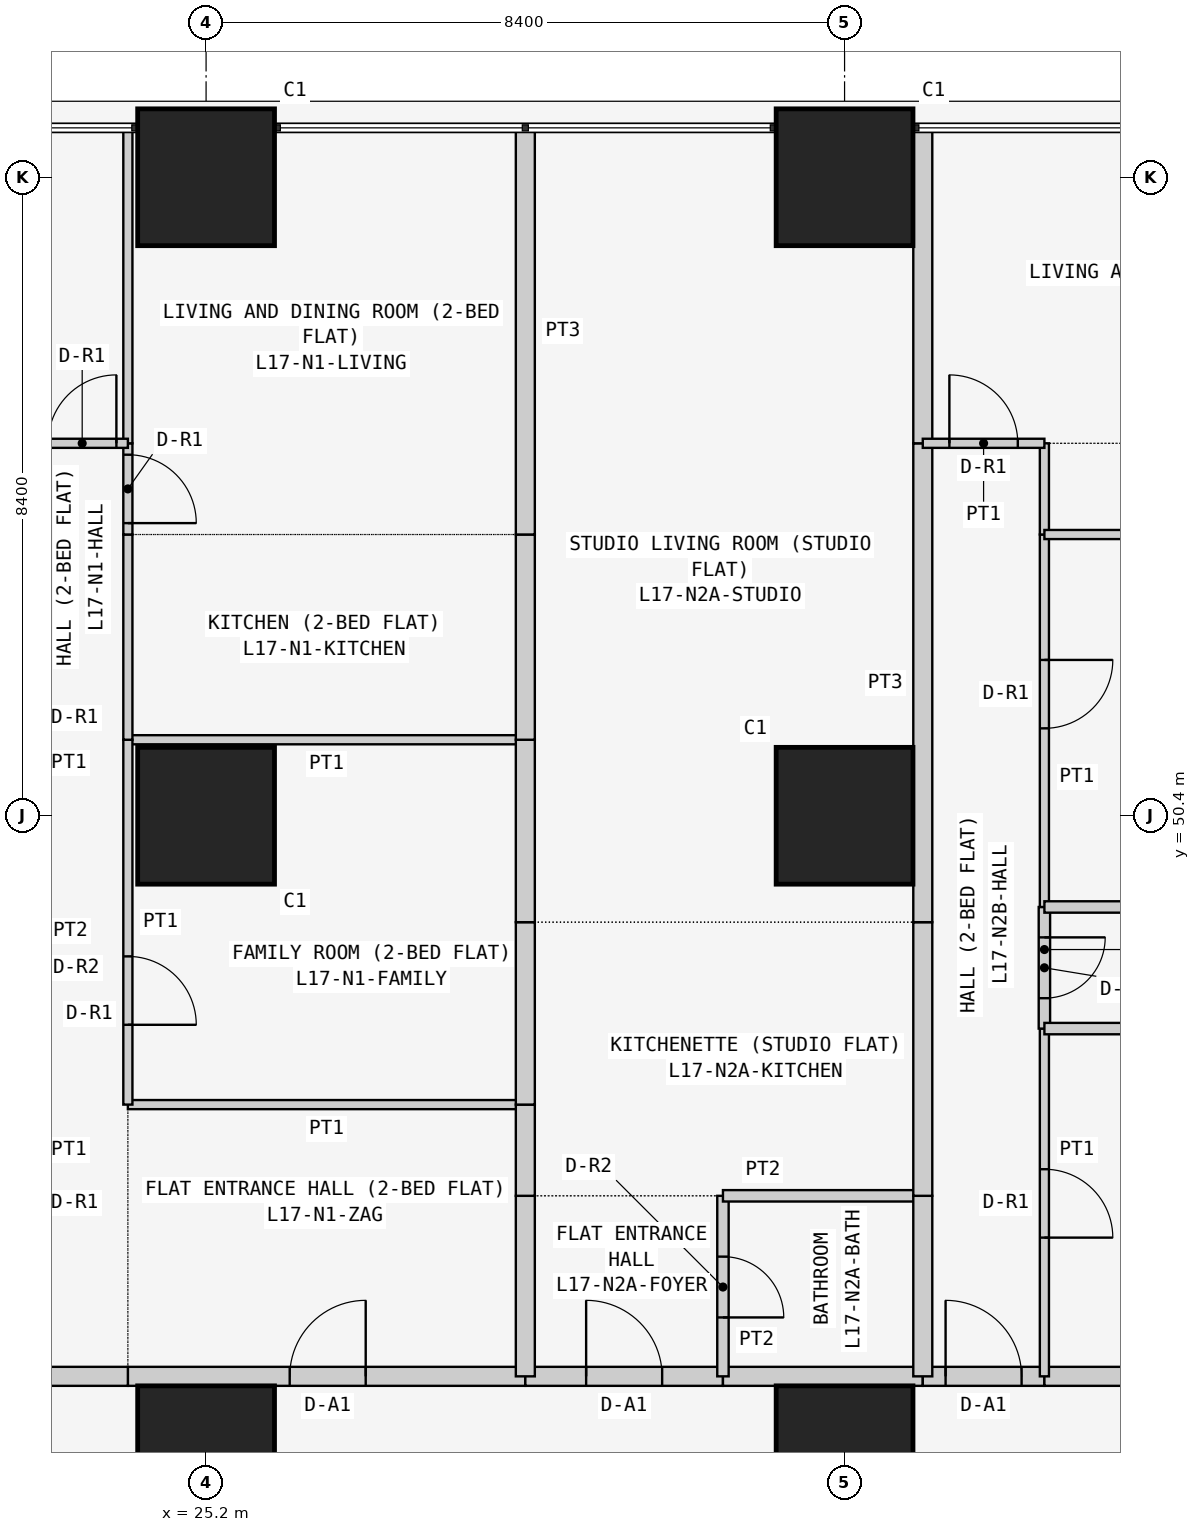
"""IFC4 building model, lengths in metres.
Left out: names, types, materials, properties, quantities, classifications, styles, units other than length and angle.
Written with IfcOpenShell. Run it as: python <this file> out.ifc"""

import sys

from ifc_helpers import new_model, si_unit, direction, frame, frame_2d, origin, origin_2d, place, context, subcontext, project, spatial, rectangle, extrude, element, fill, save


model = new_model("IFC4")
c1 = context("Model", 3, precision=1e-05, world=origin(), true_north=direction((0.0, 1.0)))
c2 = subcontext(c1, "Body", "Model", "MODEL_VIEW")
j1 = project(units=[si_unit("LENGTHUNIT", "METRE"), si_unit("PLANEANGLEUNIT", "RADIAN")], contexts=[c1])
p1 = place(None, origin())
s1 = spatial("IfcSite", under=j1, at=p1, CompositionType="ELEMENT")
p2 = place(p1, origin())
s2 = spatial("IfcBuilding", under=s1, at=p2, CompositionType="ELEMENT")
p3 = place(p2, frame((0.0, 0.0, 70.5)))
s3 = spatial("IfcBuildingStorey", under=s2, at=p3, CompositionType="ELEMENT", Elevation=70.5)
for number, where, z_axis, x_axis in (
    (1, (25.2, 42.0, 0.0), (0.0, 0.0, 1.0), (1.0, 0.0, 0.0)),
    (2, (25.2, 50.4, 0.0), (0.0, 0.0, 1.0), (1.0, 0.0, 0.0)),
    (3, (25.2, 58.8, 0.0), (0.0, 0.0, 1.0), (1.0, 0.0, 0.0)),
    (4, (33.6, 42.0, 0.0), (0.0, 0.0, 1.0), (1.0, 0.0, 0.0)),
    (5, (33.6, 50.4, 0.0), (0.0, 0.0, 1.0), (1.0, 0.0, 0.0)),
    (6, (33.6, 58.8, 0.0), (0.0, 0.0, 1.0), (1.0, 0.0, 0.0)),
):
    element("IfcColumn", number, at=place(p3, frame(where, z_axis=z_axis, x_axis=x_axis)), inside=s3, PredefinedType="COLUMN", context=c2, shape_type="SweptSolid", body=[
        extrude(rectangle(XDim=1.8, YDim=1.8, at=origin_2d()), origin(), (0.0, 0.0, 1.0), 3.6),
    ])
p4 = place(p3, frame((24.171, 43.025, 0.0), z_axis=(0.0, 0.0, 1.0), x_axis=(1.0, 0.0, 0.0)))
e7 = element("IfcWall", 7, at=p4, inside=s3, PredefinedType="PARTITIONING", context=c2, shape_type="SweptSolid", body=[
    extrude(rectangle(XDim=5.229, YDim=0.25, at=frame_2d((2.615, 0.0))), origin(), (0.0, 0.0, 1.0), 3.45),
])
p5 = place(p4, frame((2.129, 0.0, 0.0)))
e8 = element("IfcOpeningElement", 8, at=p5, cuts=e7, PredefinedType="OPENING", context=c2, shape_type="SweptSolid", body=[
    extrude(rectangle(XDim=1.0, YDim=2.1, at=frame_2d((0.5, 1.05))), frame((0.0, 0.135, 0.0), z_axis=(0.0, -1.0, 0.0), x_axis=(1.0, 0.0, 0.0)), (0.0, 0.0, 1.0), 0.27),
])
p6 = place(p3, frame((22.971, 43.025, 0.0), z_axis=(0.0, 0.0, 1.0), x_axis=(1.0, 0.0, 0.0)))
e9 = element("IfcWall", 9, at=p6, inside=s3, PredefinedType="PARTITIONING", context=c2, shape_type="SweptSolid", body=[
    extrude(rectangle(XDim=1.2, YDim=0.25, at=frame_2d((0.6, 0.0))), origin(), (0.0, 0.0, 1.0), 3.45),
])
p7 = place(p3, frame((29.4, 43.025, 0.0), z_axis=(0.0, 0.0, 1.0), x_axis=(1.0, 0.0, 0.0)))
e10 = element("IfcWall", 10, at=p7, inside=s3, PredefinedType="PARTITIONING", context=c2, shape_type="SweptSolid", body=[
    extrude(rectangle(XDim=2.6, YDim=0.25, at=frame_2d((1.3, 0.0))), origin(), (0.0, 0.0, 1.0), 3.45),
])
p8 = place(p7, frame((0.8, 0.0, 0.0)))
e11 = element("IfcOpeningElement", 11, at=p8, cuts=e10, PredefinedType="OPENING", context=c2, shape_type="SweptSolid", body=[
    extrude(rectangle(XDim=1.0, YDim=2.1, at=frame_2d((0.5, 1.05))), frame((0.0, 0.135, 0.0), z_axis=(0.0, -1.0, 0.0), x_axis=(1.0, 0.0, 0.0)), (0.0, 0.0, 1.0), 0.27),
])
p9 = place(p3, frame((32.0, 43.025, 0.0), z_axis=(0.0, 0.0, 1.0), x_axis=(1.0, 0.0, 0.0)))
e12 = element("IfcWall", 12, at=p9, inside=s3, PredefinedType="PARTITIONING", context=c2, shape_type="SweptSolid", body=[
    extrude(rectangle(XDim=2.629, YDim=0.25, at=frame_2d((1.314, 0.0))), origin(), (0.0, 0.0, 1.0), 3.45),
])
p10 = place(p3, frame((34.629, 43.025, 0.0), z_axis=(0.0, 0.0, 1.0), x_axis=(1.0, 0.0, 0.0)))
e13 = element("IfcWall", 13, at=p10, inside=s3, PredefinedType="PARTITIONING", context=c2, shape_type="SweptSolid", body=[
    extrude(rectangle(XDim=1.6, YDim=0.25, at=frame_2d((0.8, 0.0))), origin(), (0.0, 0.0, 1.0), 3.45),
])
p11 = place(p10, frame((0.3, 0.0, 0.0)))
e14 = element("IfcOpeningElement", 14, at=p11, cuts=e13, PredefinedType="OPENING", context=c2, shape_type="SweptSolid", body=[
    extrude(rectangle(XDim=1.0, YDim=2.1, at=frame_2d((0.5, 1.05))), frame((0.0, 0.135, 0.0), z_axis=(0.0, -1.0, 0.0), x_axis=(1.0, 0.0, 0.0)), (0.0, 0.0, 1.0), 0.27),
])
p12 = place(p3, frame((36.229, 43.025, 0.0), z_axis=(0.0, 0.0, 1.0), x_axis=(1.0, 0.0, 0.0)))
e15 = element("IfcWall", 15, at=p12, inside=s3, PredefinedType="PARTITIONING", context=c2, shape_type="SweptSolid", body=[
    extrude(rectangle(XDim=6.471, YDim=0.25, at=frame_2d((3.235, 0.0))), origin(), (0.0, 0.0, 1.0), 3.45),
])
p13 = place(p3, frame((29.4, 46.6, 0.0), z_axis=(0.0, 0.0, 1.0), x_axis=(-1.0, 0.0, 0.0)))
e16 = element("IfcWall", 16, at=p13, inside=s3, PredefinedType="PARTITIONING", context=c2, shape_type="SweptSolid", body=[
    extrude(rectangle(XDim=5.229, YDim=0.12, at=frame_2d((2.615, 0.0))), origin(), (0.0, 0.0, 1.0), 3.45),
])
p14 = place(p3, frame((29.4, 43.025, 0.0), z_axis=(0.0, 0.0, 1.0), x_axis=(0.0, 1.0, 0.0)))
e17 = element("IfcWall", 17, at=p14, inside=s3, PredefinedType="PARTITIONING", context=c2, shape_type="SweptSolid", body=[
    extrude(rectangle(XDim=2.375, YDim=0.25, at=frame_2d((1.188, 0.0))), origin(), (0.0, 0.0, 1.0), 2.848),
])
p15 = place(p3, frame((29.4, 45.4, 0.0), z_axis=(0.0, 0.0, 1.0), x_axis=(0.0, 1.0, 0.0)))
e18 = element("IfcWall", 18, at=p15, inside=s3, PredefinedType="PARTITIONING", context=c2, shape_type="SweptSolid", body=[
    extrude(rectangle(XDim=1.2, YDim=0.25, at=frame_2d((0.6, 0.0))), origin(), (0.0, 0.0, 1.0), 2.848),
])
p16 = place(p3, frame((29.4, 51.4, 0.0), z_axis=(0.0, 0.0, 1.0), x_axis=(-1.0, 0.0, 0.0)))
e19 = element("IfcWall", 19, at=p16, inside=s3, PredefinedType="PARTITIONING", context=c2, shape_type="SweptSolid", body=[
    extrude(rectangle(XDim=5.229, YDim=0.12, at=frame_2d((2.615, 0.0))), origin(), (0.0, 0.0, 1.0), 3.45),
])
p17 = place(p3, frame((24.171, 51.4, 0.0), z_axis=(0.0, 0.0, 1.0), x_axis=(0.0, -1.0, 0.0)))
e20 = element("IfcWall", 20, at=p17, inside=s3, PredefinedType="PARTITIONING", context=c2, shape_type="SweptSolid", body=[
    extrude(rectangle(XDim=4.8, YDim=0.12, at=frame_2d((2.4, 0.0))), origin(), (0.0, 0.0, 1.0), 3.45),
])
p18 = place(p17, frame((2.85, 0.0, 0.0)))
e21 = element("IfcOpeningElement", 21, at=p18, cuts=e20, PredefinedType="OPENING", context=c2, shape_type="SweptSolid", body=[
    extrude(rectangle(XDim=0.9, YDim=2.1, at=frame_2d((0.45, 1.05))), frame((0.0, 0.07, 0.0), z_axis=(0.0, -1.0, 0.0), x_axis=(1.0, 0.0, 0.0)), (0.0, 0.0, 1.0), 0.14),
])
for number, where, z_axis, x_axis in (
    (22, (29.4, 46.6, 0.0), (0.0, 0.0, 1.0), (0.0, 1.0, 0.0)),
    (23, (29.4, 49.0, 0.0), (0.0, 0.0, 1.0), (0.0, 1.0, 0.0)),
):
    element("IfcWall", number, at=place(p3, frame(where, z_axis=z_axis, x_axis=x_axis)), inside=s3, PredefinedType="PARTITIONING", context=c2, shape_type="SweptSolid", body=[
        extrude(rectangle(XDim=2.4, YDim=0.25, at=frame_2d((1.2, 0.0))), origin(), (0.0, 0.0, 1.0), 2.848),
    ])
p19 = place(p3, frame((24.171, 54.1, 0.0), z_axis=(0.0, 0.0, 1.0), x_axis=(0.0, -1.0, 0.0)))
e24 = element("IfcWall", 24, at=p19, inside=s3, PredefinedType="PARTITIONING", context=c2, shape_type="SweptSolid", body=[
    extrude(rectangle(XDim=2.7, YDim=0.12, at=frame_2d((1.35, 0.0))), origin(), (0.0, 0.0, 1.0), 3.45),
])
p20 = place(p3, frame((29.4, 51.4, 0.0), z_axis=(0.0, 0.0, 1.0), x_axis=(0.0, 1.0, 0.0)))
e25 = element("IfcWall", 25, at=p20, inside=s3, PredefinedType="PARTITIONING", context=c2, shape_type="SweptSolid", body=[
    extrude(rectangle(XDim=2.7, YDim=0.25, at=frame_2d((1.35, 0.0))), origin(), (0.0, 0.0, 1.0), 2.848),
])
p21 = place(p3, frame((24.171, 55.3, 0.0), z_axis=(0.0, 0.0, 1.0), x_axis=(0.0, -1.0, 0.0)))
e26 = element("IfcWall", 26, at=p21, inside=s3, PredefinedType="PARTITIONING", context=c2, shape_type="SweptSolid", body=[
    extrude(rectangle(XDim=1.2, YDim=0.12, at=frame_2d((0.6, 0.0))), origin(), (0.0, 0.0, 1.0), 3.45),
])
p22 = place(p21, frame((0.15, 0.0, 0.0)))
e27 = element("IfcOpeningElement", 27, at=p22, cuts=e26, PredefinedType="OPENING", context=c2, shape_type="SweptSolid", body=[
    extrude(rectangle(XDim=0.9, YDim=2.1, at=frame_2d((0.45, 1.05))), frame((0.0, 0.07, 0.0), z_axis=(0.0, -1.0, 0.0), x_axis=(1.0, 0.0, 0.0)), (0.0, 0.0, 1.0), 0.14),
])
p23 = place(p3, frame((24.171, 59.45, 0.0), z_axis=(0.0, 0.0, 1.0), x_axis=(0.0, -1.0, 0.0)))
e28 = element("IfcWall", 28, at=p23, inside=s3, PredefinedType="PARTITIONING", context=c2, shape_type="SweptSolid", body=[
    extrude(rectangle(XDim=4.15, YDim=0.12, at=frame_2d((2.075, 0.0))), origin(), (0.0, 0.0, 1.0), 3.45),
])
p24 = place(p3, frame((29.4, 54.1, 0.0), z_axis=(0.0, 0.0, 1.0), x_axis=(0.0, 1.0, 0.0)))
e29 = element("IfcWall", 29, at=p24, inside=s3, PredefinedType="PARTITIONING", context=c2, shape_type="SweptSolid", body=[
    extrude(rectangle(XDim=5.35, YDim=0.25, at=frame_2d((2.675, 0.0))), origin(), (0.0, 0.0, 1.0), 2.848),
])
p25 = place(p3, frame((24.171, 55.3, 0.0), z_axis=(0.0, 0.0, 1.0), x_axis=(-1.0, 0.0, 0.0)))
e30 = element("IfcWall", 30, at=p25, inside=s3, PredefinedType="PARTITIONING", context=c2, shape_type="SweptSolid", body=[
    extrude(rectangle(XDim=1.2, YDim=0.12, at=frame_2d((0.6, 0.0))), origin(), (0.0, 0.0, 1.0), 3.45),
])
p26 = place(p25, frame((0.151, 0.0, 0.0)))
e31 = element("IfcOpeningElement", 31, at=p26, cuts=e30, PredefinedType="OPENING", context=c2, shape_type="SweptSolid", body=[
    extrude(rectangle(XDim=0.9, YDim=2.1, at=frame_2d((0.45, 1.05))), frame((0.0, 0.07, 0.0), z_axis=(0.0, -1.0, 0.0), x_axis=(1.0, 0.0, 0.0)), (0.0, 0.0, 1.0), 0.14),
])
p27 = place(p3, frame((32.0, 45.4, 0.0), z_axis=(0.0, 0.0, 1.0), x_axis=(0.0, -1.0, 0.0)))
e32 = element("IfcWall", 32, at=p27, inside=s3, PredefinedType="PARTITIONING", context=c2, shape_type="SweptSolid", body=[
    extrude(rectangle(XDim=2.375, YDim=0.15, at=frame_2d((1.188, 0.0))), origin(), (0.0, 0.0, 1.0), 3.45),
])
p28 = place(p27, frame((0.8, 0.0, 0.0)))
e33 = element("IfcOpeningElement", 33, at=p28, cuts=e32, PredefinedType="OPENING", context=c2, shape_type="SweptSolid", body=[
    extrude(rectangle(XDim=0.8, YDim=2.1, at=frame_2d((0.4, 1.05))), frame((0.0, 0.085, 0.0), z_axis=(0.0, -1.0, 0.0), x_axis=(1.0, 0.0, 0.0)), (0.0, 0.0, 1.0), 0.17),
])
p29 = place(p3, frame((32.0, 45.4, 0.0), z_axis=(0.0, 0.0, 1.0), x_axis=(1.0, 0.0, 0.0)))
e34 = element("IfcWall", 34, at=p29, inside=s3, PredefinedType="PARTITIONING", context=c2, shape_type="SweptSolid", body=[
    extrude(rectangle(XDim=2.629, YDim=0.15, at=frame_2d((1.314, 0.0))), origin(), (0.0, 0.0, 1.0), 3.45),
])
p30 = place(p3, frame((34.629, 45.4, 0.0), z_axis=(0.0, 0.0, 1.0), x_axis=(0.0, -1.0, 0.0)))
e35 = element("IfcWall", 35, at=p30, inside=s3, PredefinedType="PARTITIONING", context=c2, shape_type="SweptSolid", body=[
    extrude(rectangle(XDim=2.375, YDim=0.25, at=frame_2d((1.188, 0.0))), origin(), (0.0, 0.0, 1.0), 3.45),
])
p31 = place(p3, frame((34.629, 49.0, 0.0), z_axis=(0.0, 0.0, 1.0), x_axis=(0.0, -1.0, 0.0)))
e36 = element("IfcWall", 36, at=p31, inside=s3, PredefinedType="PARTITIONING", context=c2, shape_type="SweptSolid", body=[
    extrude(rectangle(XDim=3.6, YDim=0.25, at=frame_2d((1.8, 0.0))), origin(), (0.0, 0.0, 1.0), 3.45),
])
p32 = place(p3, frame((34.629, 55.3, 0.0), z_axis=(0.0, 0.0, 1.0), x_axis=(0.0, -1.0, 0.0)))
e37 = element("IfcWall", 37, at=p32, inside=s3, PredefinedType="PARTITIONING", context=c2, shape_type="SweptSolid", body=[
    extrude(rectangle(XDim=6.3, YDim=0.25, at=frame_2d((3.15, 0.0))), origin(), (0.0, 0.0, 1.0), 3.45),
])
p33 = place(p3, frame((34.629, 59.45, 0.0), z_axis=(0.0, 0.0, 1.0), x_axis=(0.0, -1.0, 0.0)))
e38 = element("IfcWall", 38, at=p33, inside=s3, PredefinedType="PARTITIONING", context=c2, shape_type="SweptSolid", body=[
    extrude(rectangle(XDim=4.15, YDim=0.25, at=frame_2d((2.075, 0.0))), origin(), (0.0, 0.0, 1.0), 3.45),
])
p34 = place(p3, frame((36.229, 47.6, 0.0), z_axis=(0.0, 0.0, 1.0), x_axis=(0.0, -1.0, 0.0)))
e39 = element("IfcWall", 39, at=p34, inside=s3, PredefinedType="PARTITIONING", context=c2, shape_type="SweptSolid", body=[
    extrude(rectangle(XDim=4.575, YDim=0.12, at=frame_2d((2.288, 0.0))), origin(), (0.0, 0.0, 1.0), 3.45),
])
p35 = place(p34, frame((1.85, 0.0, 0.0)))
e40 = element("IfcOpeningElement", 40, at=p35, cuts=e39, PredefinedType="OPENING", context=c2, shape_type="SweptSolid", body=[
    extrude(rectangle(XDim=0.9, YDim=2.1, at=frame_2d((0.45, 1.05))), frame((0.0, 0.07, 0.0), z_axis=(0.0, -1.0, 0.0), x_axis=(1.0, 0.0, 0.0)), (0.0, 0.0, 1.0), 0.14),
])
p36 = place(p3, frame((36.229, 49.2, 0.0), z_axis=(0.0, 0.0, 1.0), x_axis=(0.0, -1.0, 0.0)))
e41 = element("IfcWall", 41, at=p36, inside=s3, PredefinedType="PARTITIONING", context=c2, shape_type="SweptSolid", body=[
    extrude(rectangle(XDim=1.6, YDim=0.15, at=frame_2d((0.8, 0.0))), origin(), (0.0, 0.0, 1.0), 3.45),
])
p37 = place(p36, frame((0.4, 0.0, 0.0)))
e42 = element("IfcOpeningElement", 42, at=p37, cuts=e41, PredefinedType="OPENING", context=c2, shape_type="SweptSolid", body=[
    extrude(rectangle(XDim=0.8, YDim=2.1, at=frame_2d((0.4, 1.05))), frame((0.0, 0.085, 0.0), z_axis=(0.0, -1.0, 0.0), x_axis=(1.0, 0.0, 0.0)), (0.0, 0.0, 1.0), 0.17),
])
p38 = place(p3, frame((36.229, 54.1, 0.0), z_axis=(0.0, 0.0, 1.0), x_axis=(0.0, -1.0, 0.0)))
e43 = element("IfcWall", 43, at=p38, inside=s3, PredefinedType="PARTITIONING", context=c2, shape_type="SweptSolid", body=[
    extrude(rectangle(XDim=4.9, YDim=0.12, at=frame_2d((2.45, 0.0))), origin(), (0.0, 0.0, 1.0), 3.45),
])
p39 = place(p38, frame((1.65, 0.0, 0.0)))
e44 = element("IfcOpeningElement", 44, at=p39, cuts=e43, PredefinedType="OPENING", context=c2, shape_type="SweptSolid", body=[
    extrude(rectangle(XDim=0.9, YDim=2.1, at=frame_2d((0.45, 1.05))), frame((0.0, 0.07, 0.0), z_axis=(0.0, -1.0, 0.0), x_axis=(1.0, 0.0, 0.0)), (0.0, 0.0, 1.0), 0.14),
])
p40 = place(p3, frame((36.229, 55.3, 0.0), z_axis=(0.0, 0.0, 1.0), x_axis=(0.0, -1.0, 0.0)))
e45 = element("IfcWall", 45, at=p40, inside=s3, PredefinedType="PARTITIONING", context=c2, shape_type="SweptSolid", body=[
    extrude(rectangle(XDim=1.2, YDim=0.12, at=frame_2d((0.6, 0.0))), origin(), (0.0, 0.0, 1.0), 3.45),
])
p41 = place(p3, frame((34.629, 55.3, 0.0), z_axis=(0.0, 0.0, 1.0), x_axis=(1.0, 0.0, 0.0)))
e46 = element("IfcWall", 46, at=p41, inside=s3, PredefinedType="PARTITIONING", context=c2, shape_type="SweptSolid", body=[
    extrude(rectangle(XDim=1.6, YDim=0.12, at=frame_2d((0.8, 0.0))), origin(), (0.0, 0.0, 1.0), 3.45),
])
p42 = place(p41, frame((0.35, 0.0, 0.0)))
e47 = element("IfcOpeningElement", 47, at=p42, cuts=e46, PredefinedType="OPENING", context=c2, shape_type="SweptSolid", body=[
    extrude(rectangle(XDim=0.9, YDim=2.1, at=frame_2d((0.45, 1.05))), frame((0.0, 0.07, 0.0), z_axis=(0.0, -1.0, 0.0), x_axis=(1.0, 0.0, 0.0)), (0.0, 0.0, 1.0), 0.14),
])
for number, where, z_axis, x_axis in (
    (48, (36.229, 47.6, 0.0), (0.0, 0.0, 1.0), (1.0, 0.0, 0.0)),
    (49, (36.229, 49.2, 0.0), (0.0, 0.0, 1.0), (1.0, 0.0, 0.0)),
):
    element("IfcWall", number, at=place(p3, frame(where, z_axis=z_axis, x_axis=x_axis)), inside=s3, PredefinedType="PARTITIONING", context=c2, shape_type="SweptSolid", body=[
        extrude(rectangle(XDim=6.471, YDim=0.15, at=frame_2d((3.235, 0.0))), origin(), (0.0, 0.0, 1.0), 3.45),
    ])
p43 = place(p3, frame((36.229, 54.1, 0.0), z_axis=(0.0, 0.0, 1.0), x_axis=(1.0, 0.0, 0.0)))
e50 = element("IfcWall", 50, at=p43, inside=s3, PredefinedType="PARTITIONING", context=c2, shape_type="SweptSolid", body=[
    extrude(rectangle(XDim=6.471, YDim=0.12, at=frame_2d((3.235, 0.0))), origin(), (0.0, 0.0, 1.0), 3.45),
])
p44 = place(p5, origin())
e51 = element("IfcDoor", 51, at=p44, inside=s3, OperationType="SINGLE_SWING_RIGHT", PredefinedType="DOOR", context=c2, shape_type="SweptSolid", body=[
    extrude(rectangle(XDim=1.0, YDim=2.1, at=frame_2d((0.5, 1.05))), frame((0.0, 0.025, 0.0), z_axis=(0.0, -1.0, 0.0), x_axis=(1.0, 0.0, 0.0)), (0.0, 0.0, 1.0), 0.05),
])
fill(e8, e51)
p45 = place(p18, origin())
e52 = element("IfcDoor", 52, at=p45, inside=s3, OperationType="SINGLE_SWING_RIGHT", PredefinedType="DOOR", context=c2, shape_type="SweptSolid", body=[
    extrude(rectangle(XDim=0.9, YDim=2.1, at=frame_2d((0.45, 1.05))), frame((0.0, 0.025, 0.0), z_axis=(0.0, -1.0, 0.0), x_axis=(1.0, 0.0, 0.0)), (0.0, 0.0, 1.0), 0.05),
])
fill(e21, e52)
p46 = place(p22, origin())
e53 = element("IfcDoor", 53, at=p46, inside=s3, OperationType="SINGLE_SWING_RIGHT", PredefinedType="DOOR", context=c2, shape_type="SweptSolid", body=[
    extrude(rectangle(XDim=0.9, YDim=2.1, at=frame_2d((0.45, 1.05))), frame((0.0, 0.025, 0.0), z_axis=(0.0, -1.0, 0.0), x_axis=(1.0, 0.0, 0.0)), (0.0, 0.0, 1.0), 0.05),
])
fill(e27, e53)
p47 = place(p26, frame((0.9, 0.0, 0.0), z_axis=(0.0, 0.0, 1.0), x_axis=(-1.0, 0.0, 0.0)))
e54 = element("IfcDoor", 54, at=p47, inside=s3, OperationType="SINGLE_SWING_RIGHT", PredefinedType="DOOR", context=c2, shape_type="SweptSolid", body=[
    extrude(rectangle(XDim=0.9, YDim=2.1, at=frame_2d((0.45, 1.05))), frame((0.0, 0.025, 0.0), z_axis=(0.0, -1.0, 0.0), x_axis=(1.0, 0.0, 0.0)), (0.0, 0.0, 1.0), 0.05),
])
fill(e31, e54)
p48 = place(p8, origin())
e55 = element("IfcDoor", 55, at=p48, inside=s3, OperationType="SINGLE_SWING_LEFT", PredefinedType="DOOR", context=c2, shape_type="SweptSolid", body=[
    extrude(rectangle(XDim=1.0, YDim=2.1, at=frame_2d((0.5, 1.05))), frame((0.0, 0.025, 0.0), z_axis=(0.0, -1.0, 0.0), x_axis=(1.0, 0.0, 0.0)), (0.0, 0.0, 1.0), 0.05),
])
fill(e11, e55)
p49 = place(p28, origin())
e56 = element("IfcDoor", 56, at=p49, inside=s3, OperationType="SINGLE_SWING_RIGHT", PredefinedType="DOOR", context=c2, shape_type="SweptSolid", body=[
    extrude(rectangle(XDim=0.8, YDim=2.1, at=frame_2d((0.4, 1.05))), frame((0.0, 0.025, 0.0), z_axis=(0.0, -1.0, 0.0), x_axis=(1.0, 0.0, 0.0)), (0.0, 0.0, 1.0), 0.05),
])
fill(e33, e56)
p50 = place(p11, origin())
e57 = element("IfcDoor", 57, at=p50, inside=s3, OperationType="SINGLE_SWING_LEFT", PredefinedType="DOOR", context=c2, shape_type="SweptSolid", body=[
    extrude(rectangle(XDim=1.0, YDim=2.1, at=frame_2d((0.5, 1.05))), frame((0.0, 0.025, 0.0), z_axis=(0.0, -1.0, 0.0), x_axis=(1.0, 0.0, 0.0)), (0.0, 0.0, 1.0), 0.05),
])
fill(e14, e57)
p51 = place(p35, origin())
e58 = element("IfcDoor", 58, at=p51, inside=s3, OperationType="SINGLE_SWING_RIGHT", PredefinedType="DOOR", context=c2, shape_type="SweptSolid", body=[
    extrude(rectangle(XDim=0.9, YDim=2.1, at=frame_2d((0.45, 1.05))), frame((0.0, 0.025, 0.0), z_axis=(0.0, -1.0, 0.0), x_axis=(1.0, 0.0, 0.0)), (0.0, 0.0, 1.0), 0.05),
])
fill(e40, e58)
p52 = place(p37, origin())
e59 = element("IfcDoor", 59, at=p52, inside=s3, OperationType="SINGLE_SWING_LEFT", PredefinedType="DOOR", context=c2, shape_type="SweptSolid", body=[
    extrude(rectangle(XDim=0.8, YDim=2.1, at=frame_2d((0.4, 1.05))), frame((0.0, 0.025, 0.0), z_axis=(0.0, -1.0, 0.0), x_axis=(1.0, 0.0, 0.0)), (0.0, 0.0, 1.0), 0.05),
])
fill(e42, e59)
p53 = place(p39, origin())
e60 = element("IfcDoor", 60, at=p53, inside=s3, OperationType="SINGLE_SWING_LEFT", PredefinedType="DOOR", context=c2, shape_type="SweptSolid", body=[
    extrude(rectangle(XDim=0.9, YDim=2.1, at=frame_2d((0.45, 1.05))), frame((0.0, 0.025, 0.0), z_axis=(0.0, -1.0, 0.0), x_axis=(1.0, 0.0, 0.0)), (0.0, 0.0, 1.0), 0.05),
])
fill(e44, e60)
p54 = place(p42, origin())
e61 = element("IfcDoor", 61, at=p54, inside=s3, OperationType="SINGLE_SWING_LEFT", PredefinedType="DOOR", context=c2, shape_type="SweptSolid", body=[
    extrude(rectangle(XDim=0.9, YDim=2.1, at=frame_2d((0.45, 1.05))), frame((0.0, 0.025, 0.0), z_axis=(0.0, -1.0, 0.0), x_axis=(1.0, 0.0, 0.0)), (0.0, 0.0, 1.0), 0.05),
])
fill(e47, e61)
save(model, sys.argv[1])
